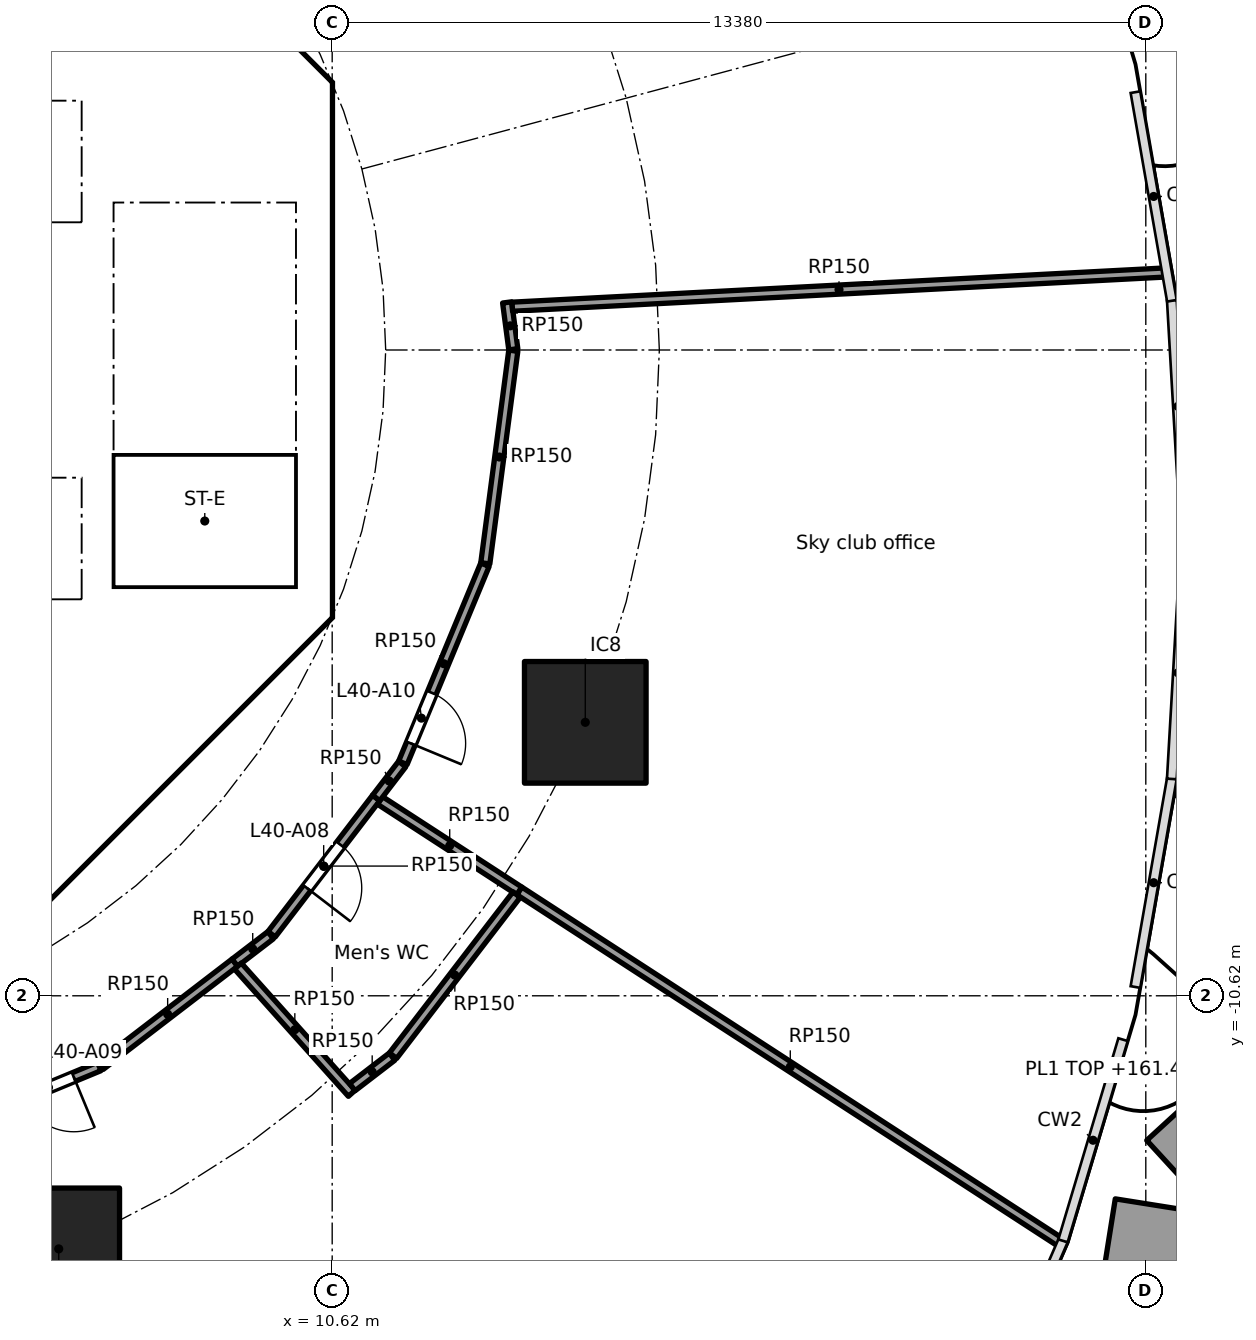
"""IFC4 building model, lengths in metres.
Left out: names, types, materials, properties, quantities, classifications, styles, units other than length and angle.
Written with IfcOpenShell. Run it as: python <this file> out.ifc"""

import sys

from ifc_helpers import new_model, si_unit, direction, frame, frame_2d, origin, origin_2d, place, context, subcontext, project, spatial, polyline, rectangle, outline, extrude, element, fill, save


model = new_model("IFC4")
c1 = context("Model", 3, precision=1e-05, world=origin(), true_north=direction((0.0, 1.0)))
c2 = subcontext(c1, "Body", "Model", "MODEL_VIEW")
j1 = project(units=[si_unit("LENGTHUNIT", "METRE"), si_unit("PLANEANGLEUNIT", "RADIAN")], contexts=[c1])
p1 = place(None, origin())
s1 = spatial("IfcSite", under=j1, at=p1, CompositionType="ELEMENT")
p2 = place(p1, origin())
s2 = spatial("IfcBuilding", under=s1, at=p2, CompositionType="ELEMENT")
p3 = place(p2, frame((0.0, 0.0, 160.3)))
s3 = spatial("IfcBuildingStorey", under=s2, at=p3, CompositionType="ELEMENT", Elevation=160.3)
for number, where, z_axis, x_axis in (
    (1, (6.123, -14.782, 0.0), (0.0, 0.0, 1.0), (1.0, 0.0, 0.0)),
    (2, (14.782, -6.123, 0.0), (0.0, 0.0, 1.0), (1.0, 0.0, 0.0)),
):
    element("IfcColumn", number, at=place(p3, frame(where, z_axis=z_axis, x_axis=x_axis)), inside=s3, PredefinedType="COLUMN", context=c2, shape_type="SweptSolid", body=[
        extrude(rectangle(XDim=2.0, YDim=2.0, at=origin_2d()), origin(), (0.0, 0.0, 1.0), 5.6),
    ])
p4 = place(p3, frame((23.456, -19.315, 0.0), z_axis=(0.0, 0.0, 1.0), x_axis=(0.157120158422, 0.987579493417, 0.0)))
e3 = element("IfcWall", 3, at=p4, inside=s3, PredefinedType="SOLIDWALL", context=c2, shape_type="SweptSolid", body=[
    extrude(rectangle(XDim=5.295, YDim=1.6, at=frame_2d((2.648, 0.0))), origin(), (0.0, 0.0, 1.0), 1.1),
])
p5 = place(p3, frame((24.556, -13.588, 0.0), z_axis=(0.0, 0.0, 1.0), x_axis=(0.737329676339, 0.6755330846, 0.0)))
e4 = element("IfcWall", 4, at=p5, inside=s3, PredefinedType="SOLIDWALL", context=c2, shape_type="SweptSolid", body=[
    extrude(rectangle(XDim=2.078, YDim=1.6, at=frame_2d((1.039, 0.0))), origin(), (0.0, 0.0, 1.0), 1.1),
])
p6 = place(p3, frame((9.988, 4.613, 0.0), z_axis=(0.0, 0.0, 1.0), x_axis=(-0.707106781187, 0.707106781187, 0.0)))
e5 = element("IfcWall", 5, at=p6, inside=s3, PredefinedType="SHEAR", context=c2, shape_type="SweptSolid", body=[
    extrude(rectangle(XDim=7.602, YDim=0.6, at=frame_2d((3.801, 0.0))), origin(), (0.0, 0.0, 1.0), 5.34),
])
p7 = place(p6, frame((3.201, 0.0, 0.0)))
e6 = element("IfcOpeningElement", 6, at=p7, cuts=e5, PredefinedType="OPENING", context=c2, shape_type="SweptSolid", body=[
    extrude(rectangle(XDim=1.2, YDim=2.1, at=frame_2d((0.6, 1.05))), frame((0.0, 0.31, 0.0), z_axis=(0.0, -1.0, 0.0), x_axis=(1.0, 0.0, 0.0)), (0.0, 0.0, 1.0), 0.62),
])
p8 = place(p3, frame((4.613, -9.988, 0.0), z_axis=(0.0, 0.0, 1.0), x_axis=(0.707106781187, 0.707106781187, 0.0)))
e7 = element("IfcWall", 7, at=p8, inside=s3, PredefinedType="SHEAR", context=c2, shape_type="SweptSolid", body=[
    extrude(rectangle(XDim=7.602, YDim=0.6, at=frame_2d((3.801, 0.0))), origin(), (0.0, 0.0, 1.0), 5.34),
])
p9 = place(p8, frame((3.201, 0.0, 0.0)))
e8 = element("IfcOpeningElement", 8, at=p9, cuts=e7, PredefinedType="OPENING", context=c2, shape_type="SweptSolid", body=[
    extrude(rectangle(XDim=1.2, YDim=2.1, at=frame_2d((0.6, 1.05))), frame((0.0, 0.31, 0.0), z_axis=(0.0, -1.0, 0.0), x_axis=(1.0, 0.0, 0.0)), (0.0, 0.0, 1.0), 0.62),
])
p10 = place(p3, frame((-6.7, 2.0, 0.0), z_axis=(0.0, 0.0, 1.0), x_axis=(1.0, 0.0, 0.0)))
e9 = element("IfcWall", 9, at=p10, inside=s3, PredefinedType="SOLIDWALL", context=c2, shape_type="SweptSolid", body=[
    extrude(rectangle(XDim=13.4, YDim=0.2, at=frame_2d((6.7, 0.0))), origin(), (0.0, 0.0, 1.0), 5.34),
])
p11 = place(p10, frame((0.65, 0.0, 0.0)))
e10 = element("IfcOpeningElement", 10, at=p11, cuts=e9, PredefinedType="OPENING", context=c2, shape_type="SweptSolid", body=[
    extrude(rectangle(XDim=1.1, YDim=2.1, at=frame_2d((0.55, 1.05))), frame((0.0, 0.11, 0.0), z_axis=(0.0, -1.0, 0.0), x_axis=(1.0, 0.0, 0.0)), (0.0, 0.0, 1.0), 0.22),
])
p12 = place(p10, frame((2.85, 0.0, 0.0)))
e11 = element("IfcOpeningElement", 11, at=p12, cuts=e9, PredefinedType="OPENING", context=c2, shape_type="SweptSolid", body=[
    extrude(rectangle(XDim=1.1, YDim=2.1, at=frame_2d((0.55, 1.05))), frame((0.0, 0.11, 0.0), z_axis=(0.0, -1.0, 0.0), x_axis=(1.0, 0.0, 0.0)), (0.0, 0.0, 1.0), 0.22),
])
p13 = place(p10, frame((5.05, 0.0, 0.0)))
e12 = element("IfcOpeningElement", 12, at=p13, cuts=e9, PredefinedType="OPENING", context=c2, shape_type="SweptSolid", body=[
    extrude(rectangle(XDim=1.1, YDim=2.1, at=frame_2d((0.55, 1.05))), frame((0.0, 0.11, 0.0), z_axis=(0.0, -1.0, 0.0), x_axis=(1.0, 0.0, 0.0)), (0.0, 0.0, 1.0), 0.22),
])
p14 = place(p10, frame((7.25, 0.0, 0.0)))
e13 = element("IfcOpeningElement", 13, at=p14, cuts=e9, PredefinedType="OPENING", context=c2, shape_type="SweptSolid", body=[
    extrude(rectangle(XDim=1.1, YDim=2.1, at=frame_2d((0.55, 1.05))), frame((0.0, 0.11, 0.0), z_axis=(0.0, -1.0, 0.0), x_axis=(1.0, 0.0, 0.0)), (0.0, 0.0, 1.0), 0.22),
])
p15 = place(p10, frame((9.45, 0.0, 0.0)))
e14 = element("IfcOpeningElement", 14, at=p15, cuts=e9, PredefinedType="OPENING", context=c2, shape_type="SweptSolid", body=[
    extrude(rectangle(XDim=1.1, YDim=2.1, at=frame_2d((0.55, 1.05))), frame((0.0, 0.11, 0.0), z_axis=(0.0, -1.0, 0.0), x_axis=(1.0, 0.0, 0.0)), (0.0, 0.0, 1.0), 0.22),
])
p16 = place(p3, frame((6.7, 4.0, 0.0), z_axis=(0.0, 0.0, 1.0), x_axis=(1.0, 0.0, 0.0)))
e15 = element("IfcWall", 15, at=p16, inside=s3, PredefinedType="SOLIDWALL", context=c2, shape_type="SweptSolid", body=[
    extrude(rectangle(XDim=3.325, YDim=0.2, at=frame_2d((1.662, 0.0))), origin(), (0.0, 0.0, 1.0), 5.34),
])
p17 = place(p16, frame((1.25, 0.0, 0.0)))
e16 = element("IfcOpeningElement", 16, at=p17, cuts=e15, PredefinedType="OPENING", context=c2, shape_type="SweptSolid", body=[
    extrude(rectangle(XDim=1.1, YDim=2.1, at=frame_2d((0.55, 1.05))), frame((0.0, 0.11, 0.0), z_axis=(0.0, -1.0, 0.0), x_axis=(1.0, 0.0, 0.0)), (0.0, 0.0, 1.0), 0.22),
])
p18 = place(p3, frame((-6.7, -2.0, 0.0), z_axis=(0.0, 0.0, 1.0), x_axis=(1.0, 0.0, 0.0)))
e17 = element("IfcWall", 17, at=p18, inside=s3, PredefinedType="SOLIDWALL", context=c2, shape_type="SweptSolid", body=[
    extrude(rectangle(XDim=13.4, YDim=0.2, at=frame_2d((6.7, 0.0))), origin(), (0.0, 0.0, 1.0), 5.34),
])
p19 = place(p18, frame((0.65, 0.0, 0.0)))
e18 = element("IfcOpeningElement", 18, at=p19, cuts=e17, PredefinedType="OPENING", context=c2, shape_type="SweptSolid", body=[
    extrude(rectangle(XDim=1.1, YDim=2.1, at=frame_2d((0.55, 1.05))), frame((0.0, 0.11, 0.0), z_axis=(0.0, -1.0, 0.0), x_axis=(1.0, 0.0, 0.0)), (0.0, 0.0, 1.0), 0.22),
])
p20 = place(p18, frame((2.85, 0.0, 0.0)))
e19 = element("IfcOpeningElement", 19, at=p20, cuts=e17, PredefinedType="OPENING", context=c2, shape_type="SweptSolid", body=[
    extrude(rectangle(XDim=1.1, YDim=2.1, at=frame_2d((0.55, 1.05))), frame((0.0, 0.11, 0.0), z_axis=(0.0, -1.0, 0.0), x_axis=(1.0, 0.0, 0.0)), (0.0, 0.0, 1.0), 0.22),
])
p21 = place(p18, frame((5.05, 0.0, 0.0)))
e20 = element("IfcOpeningElement", 20, at=p21, cuts=e17, PredefinedType="OPENING", context=c2, shape_type="SweptSolid", body=[
    extrude(rectangle(XDim=1.1, YDim=2.1, at=frame_2d((0.55, 1.05))), frame((0.0, 0.11, 0.0), z_axis=(0.0, -1.0, 0.0), x_axis=(1.0, 0.0, 0.0)), (0.0, 0.0, 1.0), 0.22),
])
p22 = place(p18, frame((7.25, 0.0, 0.0)))
e21 = element("IfcOpeningElement", 21, at=p22, cuts=e17, PredefinedType="OPENING", context=c2, shape_type="SweptSolid", body=[
    extrude(rectangle(XDim=1.1, YDim=2.1, at=frame_2d((0.55, 1.05))), frame((0.0, 0.11, 0.0), z_axis=(0.0, -1.0, 0.0), x_axis=(1.0, 0.0, 0.0)), (0.0, 0.0, 1.0), 0.22),
])
p23 = place(p3, origin())
e22 = element("IfcWall", 22, at=p23, inside=s3, PredefinedType="SHEAR", context=c2, shape_type="SweptSolid", body=[
    extrude(outline(polyline([(9.776, -4.401), (10.025, -4.152), (10.025, -3.801), (10.025, 4.152), (9.776, 4.401), (10.2, 4.825), (10.625, 4.401), (10.625, -4.401), (10.2, -4.825), (9.776, -4.401)])), origin(), (0.0, 0.0, 1.0), 5.34),
])
p24 = place(p3, origin())
e23 = element("IfcWall", 23, at=p24, inside=s3, PredefinedType="SOLIDWALL", context=c2, shape_type="SweptSolid", body=[
    extrude(outline(polyline([(-6.7, -2.1), (-6.5, -2.1), (-6.5, -4.1), (-4.5, -4.1), (-4.5, -2.1), (-4.3, -2.1), (-4.3, -4.1), (-2.3, -4.1), (-2.3, -2.1), (-2.1, -2.1), (-2.1, -4.1), (-0.1, -4.1), (-0.1, -2.1), (0.1, -2.1), (0.1, -4.1), (2.1, -4.1), (2.1, -2.1), (2.3, -2.1), (2.3, -4.1), (4.3, -4.1), (4.3, -2.1), (4.5, -2.1), (4.5, -4.1), (6.5, -4.1), (6.5, -2.1), (6.7, -2.1), (6.7, -4.3), (-6.7, -4.3), (-6.7, -2.1)])), origin(), (0.0, 0.0, 1.0), 5.34),
])
p25 = place(p3, origin())
e24 = element("IfcWall", 24, at=p25, inside=s3, PredefinedType="SOLIDWALL", context=c2, shape_type="SweptSolid", body=[
    extrude(outline(polyline([(-6.5, 2.1), (-6.7, 2.1), (-6.7, 4.3), (6.7, 4.3), (6.7, 2.1), (6.5, 2.1), (6.5, 4.1), (4.5, 4.1), (4.5, 2.1), (4.3, 2.1), (4.3, 4.1), (2.3, 4.1), (2.3, 2.1), (2.1, 2.1), (2.1, 4.1), (0.1, 4.1), (0.1, 2.1), (-0.1, 2.1), (-0.1, 4.1), (-2.1, 4.1), (-2.1, 2.1), (-2.3, 2.1), (-2.3, 4.1), (-4.3, 4.1), (-4.3, 2.1), (-4.5, 2.1), (-4.5, 4.1), (-6.5, 4.1), (-6.5, 2.1)])), origin(), (0.0, 0.0, 1.0), 5.34),
])
p26 = place(p3, origin())
e25 = element("IfcWall", 25, at=p26, inside=s3, PredefinedType="SOLIDWALL", context=c2, shape_type="SweptSolid", body=[
    extrude(outline(polyline([(7.025, -3.9), (6.7, -3.9), (6.7, 3.9), (7.025, 3.9), (7.025, -3.9)])), origin(), (0.0, 0.0, 1.0), 5.34),
])
p27 = place(p3, origin())
e26 = element("IfcWall", 26, at=p27, inside=s3, PredefinedType="SOLIDWALL", context=c2, shape_type="SweptSolid", body=[
    extrude(outline(polyline([(10.025, -4.1), (6.7, -4.1), (6.7, -3.9), (10.025, -3.9), (10.025, -4.1)])), origin(), (0.0, 0.0, 1.0), 5.34),
])
p28 = place(p3, frame((4.203, -12.935, 0.0), z_axis=(0.0, 0.0, 1.0), x_axis=(0.309019390558, -0.951055737725, 0.0)))
e27 = element("IfcWall", 27, at=p28, inside=s3, PredefinedType="PARTITIONING", context=c2, shape_type="SweptSolid", body=[
    extrude(rectangle(XDim=18.048, YDim=0.15, at=frame_2d((9.024, 0.0))), origin(), (0.0, 0.0, 1.0), 5.34),
])
p29 = place(p3, frame((6.789, -11.782, 0.0), z_axis=(0.0, 0.0, 1.0), x_axis=(-0.923883033442, -0.382674980262, 0.0)))
e28 = element("IfcWall", 28, at=p29, inside=s3, PredefinedType="PARTITIONING", context=c2, shape_type="SweptSolid", body=[
    extrude(rectangle(XDim=2.824, YDim=0.15, at=frame_2d((1.412, 0.0))), origin(), (0.0, 0.0, 1.0), 5.34),
])
p30 = place(p29, frame((0.454, 0.0, 0.0)))
e29 = element("IfcOpeningElement", 29, at=p30, cuts=e28, PredefinedType="OPENING", context=c2, shape_type="SweptSolid", body=[
    extrude(rectangle(XDim=0.9, YDim=2.1, at=frame_2d((0.45, 1.05))), frame((0.0, 0.085, 0.0), z_axis=(0.0, -1.0, 0.0), x_axis=(1.0, 0.0, 0.0)), (0.0, 0.0, 1.0), 0.17),
])
p31 = place(p3, frame((9.019, -10.075, 0.0), z_axis=(0.0, 0.0, 1.0), x_axis=(-0.793356581691, -0.608757204711, 0.0)))
e30 = element("IfcWall", 30, at=p31, inside=s3, PredefinedType="PARTITIONING", context=c2, shape_type="SweptSolid", body=[
    extrude(rectangle(XDim=2.785, YDim=0.15, at=frame_2d((1.393, 0.0))), origin(), (0.0, 0.0, 1.0), 5.34),
])
p32 = place(p3, frame((9.607, -9.624, 0.0), z_axis=(0.0, 0.0, 1.0), x_axis=(-0.793431391307, -0.608659697441, 0.0)))
e31 = element("IfcWall", 31, at=p32, inside=s3, PredefinedType="PARTITIONING", context=c2, shape_type="SweptSolid", body=[
    extrude(rectangle(XDim=0.741, YDim=0.15, at=frame_2d((0.371, 0.0))), origin(), (0.0, 0.0, 1.0), 5.34),
])
p33 = place(p3, frame((10.942, -12.224, 0.0), z_axis=(0.0, 0.0, 1.0), x_axis=(-0.666993055926, 0.745063932389, 0.0)))
e32 = element("IfcWall", 32, at=p33, inside=s3, PredefinedType="PARTITIONING", context=c2, shape_type="SweptSolid", body=[
    extrude(rectangle(XDim=2.808, YDim=0.15, at=frame_2d((1.404, 0.0))), origin(), (0.0, 0.0, 1.0), 5.34),
])
p34 = place(p3, frame((11.343, -7.366, 0.0), z_axis=(0.0, 0.0, 1.0), x_axis=(-0.608732750311, -0.793375345407, 0.0)))
e33 = element("IfcWall", 33, at=p34, inside=s3, PredefinedType="PARTITIONING", context=c2, shape_type="SweptSolid", body=[
    extrude(rectangle(XDim=2.824, YDim=0.15, at=frame_2d((1.412, 0.0))), origin(), (0.0, 0.0, 1.0), 5.34),
])
p35 = place(p34, frame((0.968, 0.0, 0.0)))
e34 = element("IfcOpeningElement", 34, at=p35, cuts=e33, PredefinedType="OPENING", context=c2, shape_type="SweptSolid", body=[
    extrude(rectangle(XDim=0.9, YDim=2.1, at=frame_2d((0.45, 1.05))), frame((0.0, 0.085, 0.0), z_axis=(0.0, -1.0, 0.0), x_axis=(1.0, 0.0, 0.0)), (0.0, 0.0, 1.0), 0.17),
])
p36 = place(p3, frame((11.406, -7.407, 0.0), z_axis=(0.0, 0.0, 1.0), x_axis=(0.838682314257, -0.544620946855, 0.0)))
e35 = element("IfcWall", 35, at=p36, inside=s3, PredefinedType="PARTITIONING", context=c2, shape_type="SweptSolid", body=[
    extrude(rectangle(XDim=2.733, YDim=0.15, at=frame_2d((1.367, 0.0))), origin(), (0.0, 0.0, 1.0), 5.34),
])
p37 = place(p3, frame((11.604, -11.621, 0.0), z_axis=(0.0, 0.0, 1.0), x_axis=(-0.793219322038, -0.608936045201, 0.0)))
e36 = element("IfcWall", 36, at=p37, inside=s3, PredefinedType="PARTITIONING", context=c2, shape_type="SweptSolid", body=[
    extrude(rectangle(XDim=0.823, YDim=0.15, at=frame_2d((0.411, 0.0))), origin(), (0.0, 0.0, 1.0), 5.34),
])
p38 = place(p3, frame((11.771, -6.809, 0.0), z_axis=(0.0, 0.0, 1.0), x_axis=(-0.608752635326, -0.793360087844, 0.0)))
e37 = element("IfcWall", 37, at=p38, inside=s3, PredefinedType="PARTITIONING", context=c2, shape_type="SweptSolid", body=[
    extrude(rectangle(XDim=0.702, YDim=0.15, at=frame_2d((0.351, 0.0))), origin(), (0.0, 0.0, 1.0), 5.34),
])
p39 = place(p3, frame((13.132, -3.531, 0.0), z_axis=(0.0, 0.0, 1.0), x_axis=(-0.382677866108, -0.923881838111, 0.0)))
e38 = element("IfcWall", 38, at=p39, inside=s3, PredefinedType="PARTITIONING", context=c2, shape_type="SweptSolid", body=[
    extrude(rectangle(XDim=3.527, YDim=0.15, at=frame_2d((1.763, 0.0))), origin(), (0.0, 0.0, 1.0), 5.34),
])
p40 = place(p39, frame((2.281, 0.0, 0.0)))
e39 = element("IfcOpeningElement", 39, at=p40, cuts=e38, PredefinedType="OPENING", context=c2, shape_type="SweptSolid", body=[
    extrude(rectangle(XDim=0.9, YDim=2.1, at=frame_2d((0.45, 1.05))), frame((0.0, 0.085, 0.0), z_axis=(0.0, -1.0, 0.0), x_axis=(1.0, 0.0, 0.0)), (0.0, 0.0, 1.0), 0.17),
])
p41 = place(p3, frame((13.497, 0.782, 0.0), z_axis=(0.0, 0.0, 1.0), x_axis=(0.130332652421, -0.991470322154, 0.0)))
e40 = element("IfcWall", 40, at=p41, inside=s3, PredefinedType="PARTITIONING", context=c2, shape_type="SweptSolid", body=[
    extrude(rectangle(XDim=0.777, YDim=0.15, at=frame_2d((0.389, 0.0))), origin(), (0.0, 0.0, 1.0), 5.34),
])
p42 = place(p3, frame((13.598, -0.012, 0.0), z_axis=(0.0, 0.0, 1.0), x_axis=(-0.130499283623, -0.991448403586, 0.0)))
e41 = element("IfcWall", 41, at=p42, inside=s3, PredefinedType="PARTITIONING", context=c2, shape_type="SweptSolid", body=[
    extrude(rectangle(XDim=3.527, YDim=0.15, at=frame_2d((1.763, 0.0))), origin(), (0.0, 0.0, 1.0), 5.34),
])
p43 = place(p3, frame((13.653, -8.956, 0.0), z_axis=(0.0, 0.0, 1.0), x_axis=(-0.608763124529, -0.79335203927, 0.0)))
e42 = element("IfcWall", 42, at=p43, inside=s3, PredefinedType="PARTITIONING", context=c2, shape_type="SweptSolid", body=[
    extrude(rectangle(XDim=3.338, YDim=0.15, at=frame_2d((1.669, 0.0))), origin(), (0.0, 0.0, 1.0), 5.34),
])
p44 = place(p3, frame((13.699, -8.896, 0.0), z_axis=(0.0, 0.0, 1.0), x_axis=(0.838668797017, -0.544641761996, 0.0)))
e43 = element("IfcWall", 43, at=p44, inside=s3, PredefinedType="PARTITIONING", context=c2, shape_type="SweptSolid", body=[
    extrude(rectangle(XDim=10.623, YDim=0.15, at=frame_2d((5.312, 0.0))), origin(), (0.0, 0.0, 1.0), 5.34),
])
p45 = place(p3, frame((24.328, 1.275, 0.0), z_axis=(0.0, 0.0, 1.0), x_axis=(-0.998630336248, -0.052320660594, 0.0)))
e44 = element("IfcWall", 44, at=p45, inside=s3, PredefinedType="PARTITIONING", context=c2, shape_type="SweptSolid", body=[
    extrude(rectangle(XDim=10.76, YDim=0.15, at=frame_2d((5.38, 0.0))), origin(), (0.0, 0.0, 1.0), 5.34),
])
p46 = place(p17, frame((1.1, 0.0, 0.0), x_axis=(-1.0, 0.0, 0.0)))
e45 = element("IfcDoor", 45, at=p46, inside=s3, OperationType="SINGLE_SWING_LEFT", PredefinedType="DOOR", context=c2, shape_type="SweptSolid", body=[
    extrude(rectangle(XDim=1.1, YDim=2.1, at=frame_2d((0.55, 1.05))), frame((0.0, 0.025, 0.0), z_axis=(0.0, -1.0, 0.0), x_axis=(1.0, 0.0, 0.0)), (0.0, 0.0, 1.0), 0.05),
])
fill(e16, e45)
p47 = place(p9, origin())
e46 = element("IfcDoor", 46, at=p47, inside=s3, OperationType="SINGLE_SWING_LEFT", PredefinedType="DOOR", context=c2, shape_type="SweptSolid", body=[
    extrude(rectangle(XDim=1.2, YDim=2.1, at=frame_2d((0.6, 1.05))), frame((0.0, 0.025, 0.0), z_axis=(0.0, -1.0, 0.0), x_axis=(1.0, 0.0, 0.0)), (0.0, 0.0, 1.0), 0.05),
])
fill(e8, e46)
p48 = place(p35, origin())
e47 = element("IfcDoor", 47, at=p48, inside=s3, OperationType="SINGLE_SWING_RIGHT", PredefinedType="DOOR", context=c2, shape_type="SweptSolid", body=[
    extrude(rectangle(XDim=0.9, YDim=2.1, at=frame_2d((0.45, 1.05))), frame((0.0, 0.025, 0.0), z_axis=(0.0, -1.0, 0.0), x_axis=(1.0, 0.0, 0.0)), (0.0, 0.0, 1.0), 0.05),
])
fill(e34, e47)
p49 = place(p30, origin())
e48 = element("IfcDoor", 48, at=p49, inside=s3, OperationType="SINGLE_SWING_LEFT", PredefinedType="DOOR", context=c2, shape_type="SweptSolid", body=[
    extrude(rectangle(XDim=0.9, YDim=2.1, at=frame_2d((0.45, 1.05))), frame((0.0, 0.025, 0.0), z_axis=(0.0, -1.0, 0.0), x_axis=(1.0, 0.0, 0.0)), (0.0, 0.0, 1.0), 0.05),
])
fill(e29, e48)
p50 = place(p40, origin())
e49 = element("IfcDoor", 49, at=p50, inside=s3, OperationType="SINGLE_SWING_RIGHT", PredefinedType="DOOR", context=c2, shape_type="SweptSolid", body=[
    extrude(rectangle(XDim=0.9, YDim=2.1, at=frame_2d((0.45, 1.05))), frame((0.0, 0.025, 0.0), z_axis=(0.0, -1.0, 0.0), x_axis=(1.0, 0.0, 0.0)), (0.0, 0.0, 1.0), 0.05),
])
fill(e39, e49)
save(model, sys.argv[1])
